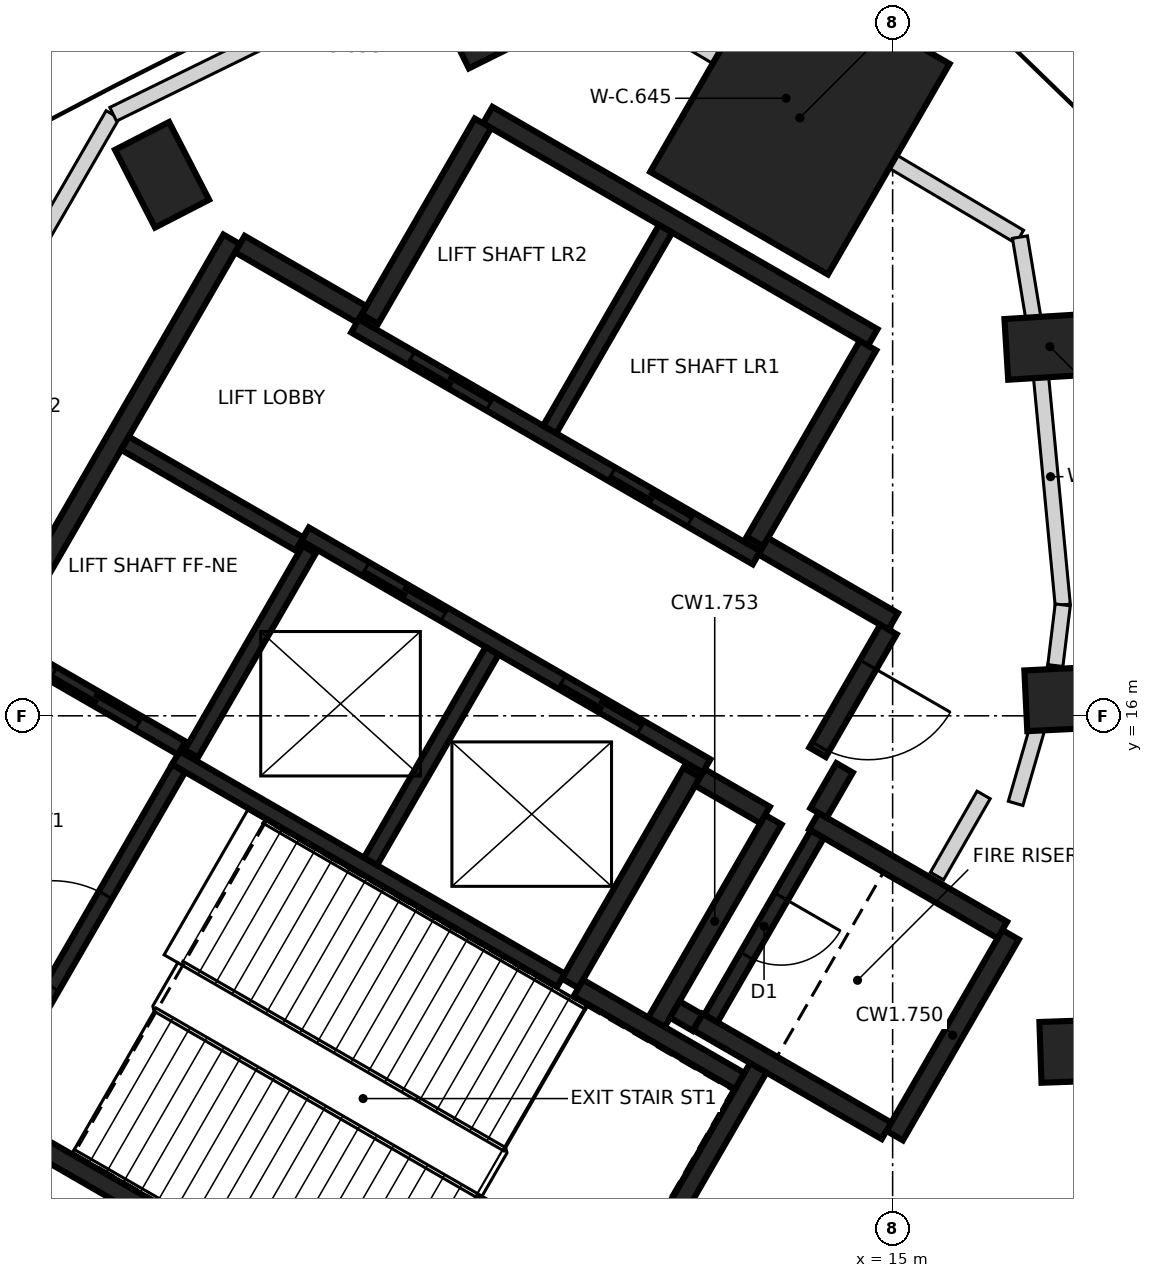
"""IFC4 building model, lengths in metres.
Left out: names, types, materials, properties, quantities, classifications, styles, units other than length and angle.
Written with IfcOpenShell. Run it as: python <this file> out.ifc"""

import sys

from ifc_helpers import new_model, si_unit, direction, frame, frame_2d, origin, origin_2d, place, context, subcontext, project, spatial, rectangle, extrude, element, fill, save


model = new_model("IFC4")
c1 = context("Model", 3, precision=1e-05, world=origin(), true_north=direction((0.0, 1.0)))
c2 = subcontext(c1, "Body", "Model", "MODEL_VIEW")
j1 = project(units=[si_unit("LENGTHUNIT", "METRE"), si_unit("PLANEANGLEUNIT", "RADIAN")], contexts=[c1])
p1 = place(None, origin())
s1 = spatial("IfcSite", under=j1, at=p1, CompositionType="ELEMENT")
p2 = place(p1, origin())
s2 = spatial("IfcBuilding", under=s1, at=p2, CompositionType="ELEMENT")
p3 = place(p2, frame((0.0, 0.0, 169.6)))
s3 = spatial("IfcBuildingStorey", under=s2, at=p3, CompositionType="ELEMENT", Elevation=169.6)
for number, where, z_axis, x_axis in (
    (1, (17.519, 11.592, -0.35), (0.0, 0.0, 1.0), (0.999, 0.034, 0.0)),
    (2, (17.326, 16.226, -0.35), (0.0, 0.0, 1.0), (0.999, 0.048, 0.0)),
    (3, (17.07, 20.856, -0.35), (0.0, 0.0, 1.0), (0.998, 0.062, 0.0)),
    (4, (9.527, 25.211, -0.35), (0.0, 0.0, 1.0), (-0.445, 0.895, 0.0)),
    (5, (5.388, 23.118, -0.35), (0.0, 0.0, 1.0), (-0.458, 0.889, 0.0)),
):
    element("IfcColumn", number, at=place(p3, frame(where, z_axis=z_axis, x_axis=x_axis)), inside=s3, PredefinedType="COLUMN", context=c2, shape_type="SweptSolid", body=[
        extrude(rectangle(XDim=1.15, YDim=0.8, at=origin_2d()), origin(), (0.0, 0.0, 1.0), 6.0),
    ])
p4 = place(p3, frame((13.78, 23.867, -0.35), z_axis=(0.0, 0.0, 1.0), x_axis=(0.5, 0.866025403784, 0.0)))
e6 = element("IfcColumn", 6, at=p4, inside=s3, PredefinedType="COLUMN", context=c2, shape_type="SweptSolid", body=[
    extrude(rectangle(XDim=3.2, YDim=2.7, at=origin_2d()), origin(), (0.0, 0.0, 1.0), 6.0),
])
p5 = place(p3, frame((10.42, 6.498, 0.0), z_axis=(0.0, 0.0, 1.0), x_axis=(-0.866021906294, 0.500006057782, 0.0)))
e7 = element("IfcWall", 7, at=p5, inside=s3, PredefinedType="SHEAR", context=c2, shape_type="SweptSolid", body=[
    extrude(rectangle(XDim=11.55, YDim=0.25, at=frame_2d((5.775, 0.0))), origin(), (0.0, 0.0, 1.0), 5.65),
])
p6 = place(p5, frame((10.025, 0.0, 0.0)))
e8 = element("IfcOpeningElement", 8, at=p6, cuts=e7, PredefinedType="OPENING", context=c2, shape_type="SweptSolid", body=[
    extrude(rectangle(XDim=1.2, YDim=2.1, at=frame_2d((0.6, 1.05))), frame((0.0, 0.135, 0.0), z_axis=(0.0, -1.0, 0.0), x_axis=(1.0, 0.0, 0.0)), (0.0, 0.0, 1.0), 0.27),
])
p7 = place(p5, frame((8.725, 0.0, 0.0)))
e9 = element("IfcOpeningElement", 9, at=p7, cuts=e7, PredefinedType="OPENING", context=c2, shape_type="SweptSolid", body=[
    extrude(rectangle(XDim=1.2, YDim=2.1, at=frame_2d((0.6, 1.05))), frame((0.0, 0.135, 0.0), z_axis=(0.0, -1.0, 0.0), x_axis=(1.0, 0.0, 0.0)), (0.0, 0.0, 1.0), 0.27),
])
p8 = place(p3, frame((3.179, 16.856, 0.0), z_axis=(0.0, 0.0, 1.0), x_axis=(0.500004234368, 0.866022959057, 0.0)))
e10 = element("IfcWall", 10, at=p8, inside=s3, PredefinedType="SHEAR", context=c2, shape_type="SweptSolid", body=[
    extrude(rectangle(XDim=6.25, YDim=0.25, at=frame_2d((3.125, 0.0))), origin(), (0.0, 0.0, 1.0), 5.65),
])
p9 = place(p3, frame((9.673, 23.903, 0.0), z_axis=(0.0, 0.0, 1.0), x_axis=(0.86603616409, -0.499981362141, 0.0)))
e11 = element("IfcWall", 11, at=p9, inside=s3, PredefinedType="SHEAR", context=c2, shape_type="SweptSolid", body=[
    extrude(rectangle(XDim=5.85, YDim=0.25, at=frame_2d((2.925, 0.0))), origin(), (0.0, 0.0, 1.0), 5.65),
])
p10 = place(p3, frame((13.238, 11.378, 0.0), z_axis=(0.0, 0.0, 1.0), x_axis=(-0.500008851346, -0.866020293397, 0.0)))
e12 = element("IfcWall", 12, at=p10, inside=s3, PredefinedType="SHEAR", context=c2, shape_type="SweptSolid", body=[
    extrude(rectangle(XDim=5.51, YDim=0.25, at=frame_2d((2.755, 0.0))), origin(), (0.0, 0.0, 1.0), 5.65),
])
p11 = place(p3, frame((12.357, 15.252, 0.0), z_axis=(0.0, 0.0, 1.0), x_axis=(-0.500028443584, -0.866008981251, 0.0)))
e13 = element("IfcWall", 13, at=p11, inside=s3, PredefinedType="SHEAR", context=c2, shape_type="SweptSolid", body=[
    extrude(rectangle(XDim=3.2, YDim=0.25, at=frame_2d((1.6, 0.0))), origin(), (0.0, 0.0, 1.0), 5.65),
])
for number, where, z_axis, x_axis in (
    (14, (8.123, 21.219, 0.0), (0.0, 0.0, 1.0), (0.5, 0.866, 0.0)),
    (15, (14.676, 20.87, 0.0), (0.0, 0.0, 1.0), (-0.5, -0.866, 0.0)),
):
    element("IfcWall", number, at=place(p3, frame(where, z_axis=z_axis, x_axis=x_axis)), inside=s3, PredefinedType="SHEAR", context=c2, shape_type="SweptSolid", body=[
        extrude(rectangle(XDim=2.975, YDim=0.25, at=frame_2d((1.487, 0.0))), origin(), (0.0, 0.0, 1.0), 5.65),
    ])
p12 = place(p3, frame((16.552, 13.119, 0.0), z_axis=(0.0, 0.0, 1.0), x_axis=(-0.499978833458, -0.866037623948, 0.0)))
e16 = element("IfcWall", 16, at=p12, inside=s3, PredefinedType="SHEAR", context=c2, shape_type="SweptSolid", body=[
    extrude(rectangle(XDim=3.05, YDim=0.25, at=frame_2d((1.525, 0.0))), origin(), (0.0, 0.0, 1.0), 5.65),
])
p13 = place(p3, frame((14.918, 10.54, 0.0), z_axis=(0.0, 0.0, 1.0), x_axis=(-0.866063538972, 0.499933942099, 0.0)))
e17 = element("IfcWall", 17, at=p13, inside=s3, PredefinedType="SHEAR", context=c2, shape_type="SweptSolid", body=[
    extrude(rectangle(XDim=2.865, YDim=0.25, at=frame_2d((1.432, 0.0))), origin(), (0.0, 0.0, 1.0), 5.65),
])
p14 = place(p3, frame((13.963, 14.614, 0.0), z_axis=(0.0, 0.0, 1.0), x_axis=(0.866042235819, -0.499970844928, 0.0)))
e18 = element("IfcWall", 18, at=p14, inside=s3, PredefinedType="SHEAR", context=c2, shape_type="SweptSolid", body=[
    extrude(rectangle(XDim=2.865, YDim=0.25, at=frame_2d((1.432, 0.0))), origin(), (0.0, 0.0, 1.0), 5.65),
])
p15 = place(p3, frame((11.888, 11.961, 0.0), z_axis=(0.0, 0.0, 1.0), x_axis=(0.500003324108, 0.866023484601, 0.0)))
e19 = element("IfcWall", 19, at=p15, inside=s3, PredefinedType="SHEAR", context=c2, shape_type="SweptSolid", body=[
    extrude(rectangle(XDim=3.085, YDim=0.25, at=frame_2d((1.542, 0.0))), origin(), (0.0, 0.0, 1.0), 5.65),
])
p16 = place(p3, frame((10.865, 12.418, 0.0), z_axis=(0.0, 0.0, 1.0), x_axis=(0.866026229868, -0.499998569178, 0.0)))
e20 = element("IfcWall", 20, at=p16, inside=s3, PredefinedType="SHEAR", context=c2, shape_type="SweptSolid", body=[
    extrude(rectangle(XDim=2.449, YDim=0.25, at=frame_2d((1.225, 0.0))), origin(), (0.0, 0.0, 1.0), 5.65),
])
p17 = place(p3, frame((13.297, 18.231, 0.0), z_axis=(0.0, 0.0, 1.0), x_axis=(0.866043531843, -0.499968599967, 0.0)))
e21 = element("IfcWall", 21, at=p17, inside=s3, PredefinedType="SHEAR", context=c2, shape_type="SweptSolid", body=[
    extrude(rectangle(XDim=1.975, YDim=0.25, at=frame_2d((0.987, 0.0))), origin(), (0.0, 0.0, 1.0), 5.65),
])
p18 = place(p3, frame((6.413, 22.206, 0.0), z_axis=(0.0, 0.0, 1.0), x_axis=(0.866016279763, -0.500015802937, 0.0)))
e22 = element("IfcWall", 22, at=p18, inside=s3, PredefinedType="SHEAR", context=c2, shape_type="SweptSolid", body=[
    extrude(rectangle(XDim=1.849, YDim=0.25, at=frame_2d((0.925, 0.0))), origin(), (0.0, 0.0, 1.0), 5.65),
])
p19 = place(p3, frame((14.945, 17.135, 0.0), z_axis=(0.0, 0.0, 1.0), x_axis=(-0.499983108224, -0.866035156036, 0.0)))
e23 = element("IfcWall", 23, at=p19, inside=s3, PredefinedType="SHEAR", context=c2, shape_type="SweptSolid", body=[
    extrude(rectangle(XDim=1.865, YDim=0.25, at=frame_2d((0.932, 0.0))), origin(), (0.0, 0.0, 1.0), 5.65),
])
p20 = place(p19, frame((0.535, 0.0, 0.0)))
e24 = element("IfcOpeningElement", 24, at=p20, cuts=e23, PredefinedType="OPENING", context=c2, shape_type="SweptSolid", body=[
    extrude(rectangle(XDim=1.25, YDim=2.1, at=frame_2d((0.625, 1.05))), frame((0.0, 0.135, 0.0), z_axis=(0.0, -1.0, 0.0), x_axis=(1.0, 0.0, 0.0)), (0.0, 0.0, 1.0), 0.27),
])
p21 = place(p3, frame((13.322, 14.695, 0.0), z_axis=(0.0, 0.0, 1.0), x_axis=(-0.866017078145, 0.500014420154, 0.0)))
e25 = element("IfcWall", 25, at=p21, inside=s3, PredefinedType="SHEAR", context=c2, shape_type="SweptSolid", body=[
    extrude(rectangle(XDim=0.989, YDim=0.25, at=frame_2d((0.495, 0.0))), origin(), (0.0, 0.0, 1.0), 5.65),
])
p22 = place(p3, frame((14.368, 15.315, 0.0), z_axis=(0.0, 0.0, 1.0), x_axis=(-0.499897359611, -0.866084655132, 0.0)))
e26 = element("IfcWall", 26, at=p22, inside=s3, PredefinedType="SHEAR", context=c2, shape_type="SweptSolid", body=[
    extrude(rectangle(XDim=0.685, YDim=0.25, at=frame_2d((0.342, 0.0))), origin(), (0.0, 0.0, 1.0), 5.65),
])
p23 = place(p3, frame((12.433, 11.964, 0.0), z_axis=(0.0, 0.0, 1.0), x_axis=(-0.866055875208, 0.499947218231, 0.0)))
e27 = element("IfcWall", 27, at=p23, inside=s3, PredefinedType="SHEAR", context=c2, shape_type="SweptSolid", body=[
    extrude(rectangle(XDim=0.345, YDim=0.25, at=frame_2d((0.172, 0.0))), origin(), (0.0, 0.0, 1.0), 5.65),
])
p24 = place(p3, frame((13.21, 18.08, 0.0), z_axis=(0.0, 0.0, 1.0), x_axis=(-0.866030299012, 0.499991521122, 0.0)))
e28 = element("IfcWall", 28, at=p24, inside=s3, PredefinedType="SHEAR", context=c2, shape_type="SweptSolid", body=[
    extrude(rectangle(XDim=6.1, YDim=0.2, at=frame_2d((3.05, 0.0))), origin(), (0.0, 0.0, 1.0), 5.65),
])
p25 = place(p24, frame((1.0, 0.0, 0.0)))
e29 = element("IfcOpeningElement", 29, at=p25, cuts=e28, PredefinedType="OPENING", context=c2, shape_type="SweptSolid", body=[
    extrude(rectangle(XDim=1.2, YDim=2.1, at=frame_2d((0.6, 1.05))), frame((0.0, 0.11, 0.0), z_axis=(0.0, -1.0, 0.0), x_axis=(1.0, 0.0, 0.0)), (0.0, 0.0, 1.0), 0.22),
])
p26 = place(p24, frame((4.05, 0.0, 0.0)))
e30 = element("IfcOpeningElement", 30, at=p26, cuts=e28, PredefinedType="OPENING", context=c2, shape_type="SweptSolid", body=[
    extrude(rectangle(XDim=1.2, YDim=2.1, at=frame_2d((0.6, 1.05))), frame((0.0, 0.11, 0.0), z_axis=(0.0, -1.0, 0.0), x_axis=(1.0, 0.0, 0.0)), (0.0, 0.0, 1.0), 0.22),
])
p27 = place(p3, frame((12.552, 15.342, 0.0), z_axis=(0.0, 0.0, 1.0), x_axis=(-0.866030299012, 0.499991521122, 0.0)))
e31 = element("IfcWall", 31, at=p27, inside=s3, PredefinedType="SHEAR", context=c2, shape_type="SweptSolid", body=[
    extrude(rectangle(XDim=6.1, YDim=0.2, at=frame_2d((3.05, 0.0))), origin(), (0.0, 0.0, 1.0), 5.65),
])
p28 = place(p27, frame((1.0, 0.0, 0.0)))
e32 = element("IfcOpeningElement", 32, at=p28, cuts=e31, PredefinedType="OPENING", context=c2, shape_type="SweptSolid", body=[
    extrude(rectangle(XDim=1.2, YDim=2.1, at=frame_2d((0.6, 1.05))), frame((0.0, 0.11, 0.0), z_axis=(0.0, -1.0, 0.0), x_axis=(1.0, 0.0, 0.0)), (0.0, 0.0, 1.0), 0.22),
])
p29 = place(p27, frame((3.982, 0.0, 0.0)))
e33 = element("IfcOpeningElement", 33, at=p29, cuts=e31, PredefinedType="OPENING", context=c2, shape_type="SweptSolid", body=[
    extrude(rectangle(XDim=1.2, YDim=2.1, at=frame_2d((0.6, 1.05))), frame((0.0, 0.11, 0.0), z_axis=(0.0, -1.0, 0.0), x_axis=(1.0, 0.0, 0.0)), (0.0, 0.0, 1.0), 0.22),
])
p30 = place(p3, frame((10.636, 12.521, 0.0), z_axis=(0.0, 0.0, 1.0), x_axis=(-0.866013252188, 0.500021046592, 0.0)))
e34 = element("IfcWall", 34, at=p30, inside=s3, PredefinedType="SHEAR", context=c2, shape_type="SweptSolid", body=[
    extrude(rectangle(XDim=5.851, YDim=0.2, at=frame_2d((2.925, 0.0))), origin(), (0.0, 0.0, 1.0), 5.65),
])
p31 = place(p3, frame((3.057, 10.895, 0.0), z_axis=(0.0, 0.0, 1.0), x_axis=(0.500027839223, 0.866009330205, 0.0)))
e35 = element("IfcWall", 35, at=p31, inside=s3, PredefinedType="SHEAR", context=c2, shape_type="SweptSolid", body=[
    extrude(rectangle(XDim=5.098, YDim=0.2, at=frame_2d((2.549, 0.0))), origin(), (0.0, 0.0, 1.0), 5.65),
])
p32 = place(p31, frame((1.774, 0.0, 0.0)))
e36 = element("IfcOpeningElement", 36, at=p32, cuts=e35, PredefinedType="OPENING", context=c2, shape_type="SweptSolid", body=[
    extrude(rectangle(XDim=1.4, YDim=2.1, at=frame_2d((0.7, 1.05))), frame((0.0, 0.11, 0.0), z_axis=(0.0, -1.0, 0.0), x_axis=(1.0, 0.0, 0.0)), (0.0, 0.0, 1.0), 0.22),
])
p33 = place(p3, frame((8.132, 14.084, 0.0), z_axis=(0.0, 0.0, 1.0), x_axis=(0.500030834389, 0.86600760081, 0.0)))
e37 = element("IfcWall", 37, at=p33, inside=s3, PredefinedType="SHEAR", context=c2, shape_type="SweptSolid", body=[
    extrude(rectangle(XDim=3.198, YDim=0.2, at=frame_2d((1.599, 0.0))), origin(), (0.0, 0.0, 1.0), 5.65),
])
p34 = place(p3, frame((10.489, 19.767, 0.0), z_axis=(0.0, 0.0, 1.0), x_axis=(0.499946628782, 0.866056215479, 0.0)))
e38 = element("IfcWall", 38, at=p34, inside=s3, PredefinedType="SHEAR", context=c2, shape_type="SweptSolid", body=[
    extrude(rectangle(XDim=3.048, YDim=0.2, at=frame_2d((1.524, 0.0))), origin(), (0.0, 0.0, 1.0), 5.65),
])
p35 = place(p3, frame((14.008, 14.442, 0.0), z_axis=(0.0, 0.0, 1.0), x_axis=(-0.499986818241, -0.866033014143, 0.0)))
e39 = element("IfcWall", 39, at=p35, inside=s3, PredefinedType="SHEAR", context=c2, shape_type="SweptSolid", body=[
    extrude(rectangle(XDim=2.798, YDim=0.2, at=frame_2d((1.399, 0.0))), origin(), (0.0, 0.0, 1.0), 5.65),
])
p36 = place(p35, frame((0.949, 0.0, 0.0)))
e40 = element("IfcOpeningElement", 40, at=p36, cuts=e39, PredefinedType="OPENING", context=c2, shape_type="SweptSolid", body=[
    extrude(rectangle(XDim=0.9, YDim=2.1, at=frame_2d((0.45, 1.05))), frame((0.0, 0.11, 0.0), z_axis=(0.0, -1.0, 0.0), x_axis=(1.0, 0.0, 0.0)), (0.0, 0.0, 1.0), 0.22),
])
p37 = place(p3, frame((7.324, 18.187, 0.0), z_axis=(0.0, 0.0, 1.0), x_axis=(-0.499967891604, -0.866043940782, 0.0)))
e41 = element("IfcWall", 41, at=p37, inside=s3, PredefinedType="SHEAR", context=c2, shape_type="SweptSolid", body=[
    extrude(rectangle(XDim=3.1, YDim=0.2, at=frame_2d((1.55, 0.0))), origin(), (0.0, 0.0, 1.0), 5.65),
])
p38 = place(p3, frame((5.646, 15.576, 0.0), z_axis=(0.0, 0.0, 1.0), x_axis=(-0.866018407898, 0.500012117035, 0.0)))
e42 = element("IfcWall", 42, at=p38, inside=s3, PredefinedType="SHEAR", context=c2, shape_type="SweptSolid", body=[
    extrude(rectangle(XDim=2.651, YDim=0.2, at=frame_2d((1.325, 0.0))), origin(), (0.0, 0.0, 1.0), 5.65),
])
p39 = place(p38, frame((0.652, 0.0, 0.0)))
e43 = element("IfcOpeningElement", 43, at=p39, cuts=e42, PredefinedType="OPENING", context=c2, shape_type="SweptSolid", body=[
    extrude(rectangle(XDim=1.3, YDim=2.1, at=frame_2d((0.65, 1.05))), frame((0.0, 0.11, 0.0), z_axis=(0.0, -1.0, 0.0), x_axis=(1.0, 0.0, 0.0)), (0.0, 0.0, 1.0), 0.22),
])
p40 = place(p3, frame((7.196, 18.26, 0.0), z_axis=(0.0, 0.0, 1.0), x_axis=(-0.866018407898, 0.500012117035, 0.0)))
e44 = element("IfcWall", 44, at=p40, inside=s3, PredefinedType="SHEAR", context=c2, shape_type="SweptSolid", body=[
    extrude(rectangle(XDim=2.651, YDim=0.2, at=frame_2d((1.325, 0.0))), origin(), (0.0, 0.0, 1.0), 5.65),
])
p41 = place(p3, frame((-1.985, 12.265, 0.0), z_axis=(0.0, 0.0, 1.0), x_axis=(0.500003233276, 0.866023537044, 0.0)))
e45 = element("IfcWall", 45, at=p41, inside=s3, PredefinedType="PARTITIONING", context=c2, shape_type="SweptSolid", body=[
    extrude(rectangle(XDim=13.448, YDim=0.2, at=frame_2d((6.724, 0.0))), origin(), (0.0, 0.0, 1.0), 4.75),
])
p42 = place(p41, frame((10.427, 0.0, 0.0)))
e46 = element("IfcOpeningElement", 46, at=p42, cuts=e45, PredefinedType="OPENING", context=c2, shape_type="SweptSolid", body=[
    extrude(rectangle(XDim=0.9, YDim=2.1, at=frame_2d((0.45, 1.05))), frame((0.0, 0.11, 0.0), z_axis=(0.0, -1.0, 0.0), x_axis=(1.0, 0.0, 0.0)), (0.0, 0.0, 1.0), 0.22),
])
p43 = place(p41, frame((2.568, 0.0, 0.0)))
e47 = element("IfcOpeningElement", 47, at=p43, cuts=e45, PredefinedType="OPENING", context=c2, shape_type="SweptSolid", body=[
    extrude(rectangle(XDim=1.0, YDim=2.1, at=frame_2d((0.5, 1.05))), frame((0.0, 0.11, 0.0), z_axis=(0.0, -1.0, 0.0), x_axis=(1.0, 0.0, 0.0)), (0.0, 0.0, 1.0), 0.22),
])
p44 = place(p3, frame((4.745, 23.914, 0.0), z_axis=(0.0, 0.0, 1.0), x_axis=(0.897871376736, 0.44025786857, 0.0)))
e48 = element("IfcWall", 48, at=p44, inside=s3, PredefinedType="PARTITIONING", context=c2, shape_type="SweptSolid", body=[
    extrude(rectangle(XDim=5.177, YDim=0.2, at=frame_2d((2.588, 0.0))), origin(), (0.0, 0.0, 1.0), 5.65),
])
p45 = place(p3, frame((10.526, 25.947, 0.0), z_axis=(0.0, 0.0, 1.0), x_axis=(0.860134432283, -0.510067405742, 0.0)))
e49 = element("IfcWall", 49, at=p45, inside=s3, PredefinedType="PARTITIONING", context=c2, shape_type="SweptSolid", body=[
    extrude(rectangle(XDim=7.146, YDim=0.2, at=frame_2d((3.573, 0.0))), origin(), (0.0, 0.0, 1.0), 4.75),
])
p46 = place(p3, frame((15.584, 13.891, 0.0), z_axis=(0.0, 0.0, 1.0), x_axis=(0.498102255804, 0.867118298021, 0.0)))
e50 = element("IfcWall", 50, at=p46, inside=s3, PredefinedType="PARTITIONING", context=c2, shape_type="SweptSolid", body=[
    extrude(rectangle(XDim=1.231, YDim=0.2, at=frame_2d((0.616, 0.0))), origin(), (0.0, 0.0, 1.0), 5.65),
])
p47 = place(p3, frame((16.618, 14.848, 0.0), z_axis=(0.0, 0.0, 1.0), x_axis=(0.277680505718, 0.960673480817, 0.0)))
e51 = element("IfcWall", 51, at=p47, inside=s3, PredefinedType="PARTITIONING", context=c2, shape_type="SweptSolid", body=[
    extrude(rectangle(XDim=1.884, YDim=0.2, at=frame_2d((0.942, 0.0))), origin(), (0.0, 0.0, 1.0), 5.65),
])
p48 = place(p3, frame((16.675, 22.298, 0.0), z_axis=(0.0, 0.0, 1.0), x_axis=(0.162826774329, -0.98665467189, 0.0)))
e52 = element("IfcWall", 52, at=p48, inside=s3, PredefinedType="PARTITIONING", context=c2, shape_type="SweptSolid", body=[
    extrude(rectangle(XDim=1.486, YDim=0.2, at=frame_2d((0.743, 0.0))), origin(), (0.0, 0.0, 1.0), 5.65),
])
p49 = place(p3, frame((16.917, 20.832, 0.0), z_axis=(0.0, 0.0, 1.0), x_axis=(0.094778481, -0.995498387512, 0.0)))
e53 = element("IfcWall", 53, at=p49, inside=s3, PredefinedType="PARTITIONING", context=c2, shape_type="SweptSolid", body=[
    extrude(rectangle(XDim=3.387, YDim=0.2, at=frame_2d((1.694, 0.0))), origin(), (0.0, 0.0, 1.0), 4.75),
])
p50 = place(p3, frame((17.141, 16.661, 0.0), z_axis=(0.0, 0.0, 1.0), x_axis=(0.120412889455, 0.992723897191, 0.0)))
e54 = element("IfcWall", 54, at=p50, inside=s3, PredefinedType="PARTITIONING", context=c2, shape_type="SweptSolid", body=[
    extrude(rectangle(XDim=0.805, YDim=0.2, at=frame_2d((0.402, 0.0))), origin(), (0.0, 0.0, 1.0), 4.75),
])
p51 = place(p3, frame((13.845, 23.98, 0.0), z_axis=(0.0, 0.0, 1.0), x_axis=(0.499958721521, 0.866049234614, 0.0)))
e55 = element("IfcWall", 55, at=p51, inside=s3, PredefinedType="PARTITIONING", context=c2, shape_type="SweptSolid", body=[
    extrude(rectangle(XDim=2.564, YDim=0.2, at=frame_2d((1.282, 0.0))), origin(), (0.0, 0.0, 1.0), 5.65),
])
p52 = place(p39, origin())
e56 = element("IfcDoor", 56, at=p52, inside=s3, OperationType="SLIDING_TO_LEFT", PredefinedType="DOOR", context=c2, shape_type="SweptSolid", body=[
    extrude(rectangle(XDim=1.3, YDim=2.1, at=frame_2d((0.65, 1.05))), frame((0.0, 0.025, 0.0), z_axis=(0.0, -1.0, 0.0), x_axis=(1.0, 0.0, 0.0)), (0.0, 0.0, 1.0), 0.05),
])
fill(e43, e56)
p53 = place(p28, origin())
e57 = element("IfcDoor", 57, at=p53, inside=s3, OperationType="DOUBLE_DOOR_SLIDING", PredefinedType="DOOR", context=c2, shape_type="SweptSolid", body=[
    extrude(rectangle(XDim=1.2, YDim=2.1, at=frame_2d((0.6, 1.05))), frame((0.0, 0.025, 0.0), z_axis=(0.0, -1.0, 0.0), x_axis=(1.0, 0.0, 0.0)), (0.0, 0.0, 1.0), 0.05),
])
fill(e32, e57)
p54 = place(p29, origin())
e58 = element("IfcDoor", 58, at=p54, inside=s3, OperationType="DOUBLE_DOOR_SLIDING", PredefinedType="DOOR", context=c2, shape_type="SweptSolid", body=[
    extrude(rectangle(XDim=1.2, YDim=2.1, at=frame_2d((0.6, 1.05))), frame((0.0, 0.025, 0.0), z_axis=(0.0, -1.0, 0.0), x_axis=(1.0, 0.0, 0.0)), (0.0, 0.0, 1.0), 0.05),
])
fill(e33, e58)
p55 = place(p25, origin())
e59 = element("IfcDoor", 59, at=p55, inside=s3, OperationType="DOUBLE_DOOR_SLIDING", PredefinedType="DOOR", context=c2, shape_type="SweptSolid", body=[
    extrude(rectangle(XDim=1.2, YDim=2.1, at=frame_2d((0.6, 1.05))), frame((0.0, 0.025, 0.0), z_axis=(0.0, -1.0, 0.0), x_axis=(1.0, 0.0, 0.0)), (0.0, 0.0, 1.0), 0.05),
])
fill(e29, e59)
p56 = place(p26, origin())
e60 = element("IfcDoor", 60, at=p56, inside=s3, OperationType="DOUBLE_DOOR_SLIDING", PredefinedType="DOOR", context=c2, shape_type="SweptSolid", body=[
    extrude(rectangle(XDim=1.2, YDim=2.1, at=frame_2d((0.6, 1.05))), frame((0.0, 0.025, 0.0), z_axis=(0.0, -1.0, 0.0), x_axis=(1.0, 0.0, 0.0)), (0.0, 0.0, 1.0), 0.05),
])
fill(e30, e60)
p57 = place(p20, origin())
e61 = element("IfcDoor", 61, at=p57, inside=s3, OperationType="SINGLE_SWING_LEFT", PredefinedType="DOOR", context=c2, shape_type="SweptSolid", body=[
    extrude(rectangle(XDim=1.25, YDim=2.1, at=frame_2d((0.625, 1.05))), frame((0.0, 0.025, 0.0), z_axis=(0.0, -1.0, 0.0), x_axis=(1.0, 0.0, 0.0)), (0.0, 0.0, 1.0), 0.05),
])
fill(e24, e61)
p58 = place(p32, origin())
e62 = element("IfcDoor", 62, at=p58, inside=s3, OperationType="SINGLE_SWING_LEFT", PredefinedType="DOOR", context=c2, shape_type="SweptSolid", body=[
    extrude(rectangle(XDim=1.4, YDim=2.1, at=frame_2d((0.7, 1.05))), frame((0.0, 0.025, 0.0), z_axis=(0.0, -1.0, 0.0), x_axis=(1.0, 0.0, 0.0)), (0.0, 0.0, 1.0), 0.05),
])
fill(e36, e62)
p59 = place(p36, origin())
e63 = element("IfcDoor", 63, at=p59, inside=s3, OperationType="SINGLE_SWING_RIGHT", PredefinedType="DOOR", context=c2, shape_type="SweptSolid", body=[
    extrude(rectangle(XDim=0.9, YDim=2.1, at=frame_2d((0.45, 1.05))), frame((0.0, 0.025, 0.0), z_axis=(0.0, -1.0, 0.0), x_axis=(1.0, 0.0, 0.0)), (0.0, 0.0, 1.0), 0.05),
])
fill(e40, e63)
save(model, sys.argv[1])
